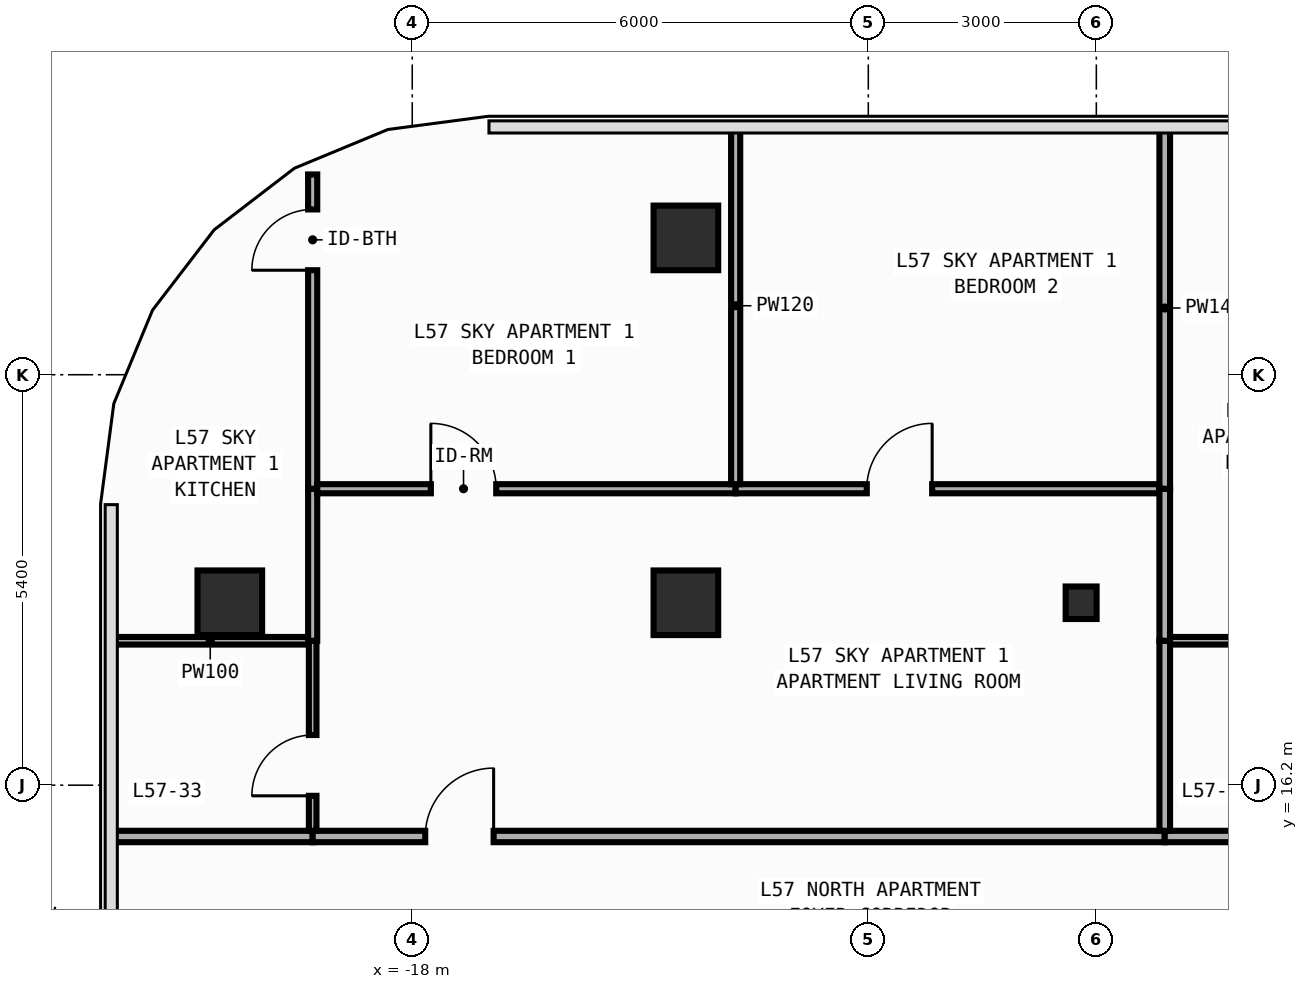
"""IFC4 building model, lengths in metres.
Left out: names, types, materials, properties, quantities, classifications, styles, units other than length and angle.
Written with IfcOpenShell. Run it as: python <this file> out.ifc"""

import sys

from ifc_helpers import new_model, si_unit, direction, frame, frame_2d, origin, origin_2d, place, context, subcontext, project, spatial, rectangle, i_section, extrude, element, fill, save


model = new_model("IFC4")
c1 = context("Model", 3, precision=1e-05, world=origin(), true_north=direction((0.0, 1.0)))
c2 = subcontext(c1, "Body", "Model", "MODEL_VIEW")
j1 = project(units=[si_unit("LENGTHUNIT", "METRE"), si_unit("PLANEANGLEUNIT", "RADIAN")], contexts=[c1])
p1 = place(None, origin())
s1 = spatial("IfcSite", under=j1, at=p1, CompositionType="ELEMENT")
p2 = place(p1, origin())
s2 = spatial("IfcBuilding", under=s1, at=p2, CompositionType="ELEMENT")
p3 = place(p2, frame((0.0, 0.0, 244.0)))
s3 = spatial("IfcBuildingStorey", under=s2, at=p3, CompositionType="ELEMENT", Elevation=244.0)
p4 = place(p3, frame((-9.2, 18.6, 0.0), z_axis=(0.0, 0.0, 1.0), x_axis=(1.0, 0.0, 0.0)))
e1 = element("IfcColumn", 1, at=p4, inside=s3, PredefinedType="COLUMN", context=c2, shape_type="SweptSolid", body=[
    extrude(i_section(OverallWidth=0.407, OverallDepth=0.428, WebThickness=0.02, FlangeThickness=0.035, FilletRadius=0.022, at=origin_2d()), origin(), (0.0, 0.0, 1.0), 3.6),
])
for number, where, z_axis, x_axis in (
    (2, (-20.4, 18.6, 0.0), (0.0, 0.0, 1.0), (1.0, 0.0, 0.0)),
    (3, (-14.4, 18.6, 0.0), (0.0, 0.0, 1.0), (1.0, 0.0, 0.0)),
    (4, (-14.4, 23.4, 0.0), (0.0, 0.0, 1.0), (1.0, 0.0, 0.0)),
):
    element("IfcColumn", number, at=place(p3, frame(where, z_axis=z_axis, x_axis=x_axis)), inside=s3, PredefinedType="COLUMN", context=c2, shape_type="SweptSolid", body=[
        extrude(rectangle(XDim=0.85, YDim=0.85, at=origin_2d()), origin(), (0.0, 0.0, 1.0), 3.6),
    ])
p5 = place(p3, frame((-21.955, 15.525, 0.0), z_axis=(0.0, 0.0, 1.0), x_axis=(1.0, 0.0, 0.0)))
e5 = element("IfcWall", 5, at=p5, inside=s3, PredefinedType="PARTITIONING", context=c2, shape_type="SweptSolid", body=[
    extrude(rectangle(XDim=2.645, YDim=0.15, at=frame_2d((1.323, 0.0))), origin(), (0.0, 0.0, 1.0), 3.34),
])
p6 = place(p3, frame((-19.31, 15.525, 0.0), z_axis=(0.0, 0.0, 1.0), x_axis=(1.0, 0.0, 0.0)))
e6 = element("IfcWall", 6, at=p6, inside=s3, PredefinedType="PARTITIONING", context=c2, shape_type="SweptSolid", body=[
    extrude(rectangle(XDim=11.21, YDim=0.15, at=frame_2d((5.605, 0.0))), origin(), (0.0, 0.0, 1.0), 3.34),
])
p7 = place(p6, frame((1.481, 0.0, 0.0)))
e7 = element("IfcOpeningElement", 7, at=p7, cuts=e6, PredefinedType="OPENING", context=c2, shape_type="SweptSolid", body=[
    extrude(rectangle(XDim=0.9, YDim=2.15, at=frame_2d((0.45, 1.075))), frame((0.0, 0.085, 0.0), z_axis=(0.0, -1.0, 0.0), x_axis=(1.0, 0.0, 0.0)), (0.0, 0.0, 1.0), 0.17),
])
p8 = place(p3, frame((-8.1, 15.525, 0.0), z_axis=(0.0, 0.0, 1.0), x_axis=(1.0, 0.0, 0.0)))
e8 = element("IfcWall", 8, at=p8, inside=s3, PredefinedType="PARTITIONING", context=c2, shape_type="SweptSolid", body=[
    extrude(rectangle(XDim=2.59, YDim=0.15, at=frame_2d((1.295, 0.0))), origin(), (0.0, 0.0, 1.0), 3.34),
])
p9 = place(p3, frame((-21.955, 18.1, 0.0), z_axis=(0.0, 0.0, 1.0), x_axis=(1.0, 0.0, 0.0)))
e9 = element("IfcWall", 9, at=p9, inside=s3, PredefinedType="PARTITIONING", context=c2, shape_type="SweptSolid", body=[
    extrude(rectangle(XDim=2.595, YDim=0.1, at=frame_2d((1.297, 0.0))), origin(), (0.0, 0.0, 1.0), 3.34),
])
p10 = place(p3, frame((-19.31, 15.6, 0.0), z_axis=(0.0, 0.0, 1.0), x_axis=(0.0, 1.0, 0.0)))
e10 = element("IfcWall", 10, at=p10, inside=s3, PredefinedType="PARTITIONING", context=c2, shape_type="SweptSolid", body=[
    extrude(rectangle(XDim=2.5, YDim=0.1, at=frame_2d((1.25, 0.0))), origin(), (0.0, 0.0, 1.0), 3.34),
])
p11 = place(p10, frame((0.46, 0.0, 0.0)))
e11 = element("IfcOpeningElement", 11, at=p11, cuts=e10, PredefinedType="OPENING", context=c2, shape_type="SweptSolid", body=[
    extrude(rectangle(XDim=0.8, YDim=2.1, at=frame_2d((0.4, 1.05))), frame((0.0, 0.06, 0.0), z_axis=(0.0, -1.0, 0.0), x_axis=(1.0, 0.0, 0.0)), (0.0, 0.0, 1.0), 0.12),
])
p12 = place(p3, frame((-19.31, 18.1, 0.0), z_axis=(0.0, 0.0, 1.0), x_axis=(0.0, 1.0, 0.0)))
e12 = element("IfcWall", 12, at=p12, inside=s3, PredefinedType="PARTITIONING", context=c2, shape_type="SweptSolid", body=[
    extrude(rectangle(XDim=2.0, YDim=0.12, at=frame_2d((1.0, 0.0))), origin(), (0.0, 0.0, 1.0), 3.34),
])
p13 = place(p3, frame((-19.31, 20.1, 0.0), z_axis=(0.0, 0.0, 1.0), x_axis=(0.0, 1.0, 0.0)))
e13 = element("IfcWall", 13, at=p13, inside=s3, PredefinedType="PARTITIONING", context=c2, shape_type="SweptSolid", body=[
    extrude(rectangle(XDim=4.135, YDim=0.12, at=frame_2d((2.067, 0.0))), origin(), (0.0, 0.0, 1.0), 3.34),
])
p14 = place(p13, frame((2.875, 0.0, 0.0)))
e14 = element("IfcOpeningElement", 14, at=p14, cuts=e13, PredefinedType="OPENING", context=c2, shape_type="SweptSolid", body=[
    extrude(rectangle(XDim=0.8, YDim=2.1, at=frame_2d((0.4, 1.05))), frame((0.0, 0.07, 0.0), z_axis=(0.0, -1.0, 0.0), x_axis=(1.0, 0.0, 0.0)), (0.0, 0.0, 1.0), 0.14),
])
p15 = place(p3, frame((-19.25, 20.1, 0.0), z_axis=(0.0, 0.0, 1.0), x_axis=(1.0, 0.0, 0.0)))
e15 = element("IfcWall", 15, at=p15, inside=s3, PredefinedType="PARTITIONING", context=c2, shape_type="SweptSolid", body=[
    extrude(rectangle(XDim=5.505, YDim=0.12, at=frame_2d((2.752, 0.0))), origin(), (0.0, 0.0, 1.0), 3.34),
])
p16 = place(p15, frame((1.495, 0.0, 0.0)))
e16 = element("IfcOpeningElement", 16, at=p16, cuts=e15, PredefinedType="OPENING", context=c2, shape_type="SweptSolid", body=[
    extrude(rectangle(XDim=0.86, YDim=2.15, at=frame_2d((0.43, 1.075))), frame((0.0, 0.07, 0.0), z_axis=(0.0, -1.0, 0.0), x_axis=(1.0, 0.0, 0.0)), (0.0, 0.0, 1.0), 0.14),
])
p17 = place(p3, frame((-13.745, 20.1, 0.0), z_axis=(0.0, 0.0, 1.0), x_axis=(1.0, 0.0, 0.0)))
e17 = element("IfcWall", 17, at=p17, inside=s3, PredefinedType="PARTITIONING", context=c2, shape_type="SweptSolid", body=[
    extrude(rectangle(XDim=5.575, YDim=0.12, at=frame_2d((2.788, 0.0))), origin(), (0.0, 0.0, 1.0), 3.34),
])
p18 = place(p17, frame((1.725, 0.0, 0.0)))
e18 = element("IfcOpeningElement", 18, at=p18, cuts=e17, PredefinedType="OPENING", context=c2, shape_type="SweptSolid", body=[
    extrude(rectangle(XDim=0.86, YDim=2.15, at=frame_2d((0.43, 1.075))), frame((0.0, 0.07, 0.0), z_axis=(0.0, -1.0, 0.0), x_axis=(1.0, 0.0, 0.0)), (0.0, 0.0, 1.0), 0.14),
])
p19 = place(p3, frame((-8.1, 15.6, 0.0), z_axis=(0.0, 0.0, 1.0), x_axis=(0.0, 1.0, 0.0)))
e19 = element("IfcWall", 19, at=p19, inside=s3, PredefinedType="PARTITIONING", context=c2, shape_type="SweptSolid", body=[
    extrude(rectangle(XDim=2.5, YDim=0.14, at=frame_2d((1.25, 0.0))), origin(), (0.0, 0.0, 1.0), 3.34),
])
p20 = place(p3, frame((-8.1, 18.1, 0.0), z_axis=(0.0, 0.0, 1.0), x_axis=(0.0, 1.0, 0.0)))
e20 = element("IfcWall", 20, at=p20, inside=s3, PredefinedType="PARTITIONING", context=c2, shape_type="SweptSolid", body=[
    extrude(rectangle(XDim=2.0, YDim=0.14, at=frame_2d((1.0, 0.0))), origin(), (0.0, 0.0, 1.0), 3.34),
])
p21 = place(p3, frame((-13.745, 20.16, 0.0), z_axis=(0.0, 0.0, 1.0), x_axis=(0.0, 1.0, 0.0)))
e21 = element("IfcWall", 21, at=p21, inside=s3, PredefinedType="PARTITIONING", context=c2, shape_type="SweptSolid", body=[
    extrude(rectangle(XDim=4.695, YDim=0.12, at=frame_2d((2.348, 0.0))), origin(), (0.0, 0.0, 1.0), 3.34),
])
p22 = place(p3, frame((-8.1, 20.1, 0.0), z_axis=(0.0, 0.0, 1.0), x_axis=(0.0, 1.0, 0.0)))
e22 = element("IfcWall", 22, at=p22, inside=s3, PredefinedType="PARTITIONING", context=c2, shape_type="SweptSolid", body=[
    extrude(rectangle(XDim=4.755, YDim=0.14, at=frame_2d((2.377, 0.0))), origin(), (0.0, 0.0, 1.0), 3.34),
])
p23 = place(p3, frame((-8.03, 18.1, 0.0), z_axis=(0.0, 0.0, 1.0), x_axis=(1.0, 0.0, 0.0)))
e23 = element("IfcWall", 23, at=p23, inside=s3, PredefinedType="PARTITIONING", context=c2, shape_type="SweptSolid", body=[
    extrude(rectangle(XDim=2.47, YDim=0.1, at=frame_2d((1.235, 0.0))), origin(), (0.0, 0.0, 1.0), 3.34),
])
p24 = place(p7, origin())
e24 = element("IfcDoor", 24, at=p24, inside=s3, OperationType="SINGLE_SWING_RIGHT", PredefinedType="DOOR", context=c2, shape_type="SweptSolid", body=[
    extrude(rectangle(XDim=0.9, YDim=2.15, at=frame_2d((0.45, 1.075))), frame((0.0, 0.025, 0.0), z_axis=(0.0, -1.0, 0.0), x_axis=(1.0, 0.0, 0.0)), (0.0, 0.0, 1.0), 0.05),
])
fill(e7, e24)
p25 = place(p11, origin())
e25 = element("IfcDoor", 25, at=p25, inside=s3, OperationType="SINGLE_SWING_LEFT", PredefinedType="DOOR", context=c2, shape_type="SweptSolid", body=[
    extrude(rectangle(XDim=0.8, YDim=2.1, at=frame_2d((0.4, 1.05))), frame((0.0, 0.025, 0.0), z_axis=(0.0, -1.0, 0.0), x_axis=(1.0, 0.0, 0.0)), (0.0, 0.0, 1.0), 0.05),
])
fill(e11, e25)
p26 = place(p16, origin())
e26 = element("IfcDoor", 26, at=p26, inside=s3, OperationType="SINGLE_SWING_LEFT", PredefinedType="DOOR", context=c2, shape_type="SweptSolid", body=[
    extrude(rectangle(XDim=0.86, YDim=2.15, at=frame_2d((0.43, 1.075))), frame((0.0, 0.025, 0.0), z_axis=(0.0, -1.0, 0.0), x_axis=(1.0, 0.0, 0.0)), (0.0, 0.0, 1.0), 0.05),
])
fill(e16, e26)
p27 = place(p18, origin())
e27 = element("IfcDoor", 27, at=p27, inside=s3, OperationType="SINGLE_SWING_RIGHT", PredefinedType="DOOR", context=c2, shape_type="SweptSolid", body=[
    extrude(rectangle(XDim=0.86, YDim=2.15, at=frame_2d((0.43, 1.075))), frame((0.0, 0.025, 0.0), z_axis=(0.0, -1.0, 0.0), x_axis=(1.0, 0.0, 0.0)), (0.0, 0.0, 1.0), 0.05),
])
fill(e18, e27)
p28 = place(p14, origin())
e28 = element("IfcDoor", 28, at=p28, inside=s3, OperationType="SINGLE_SWING_LEFT", PredefinedType="DOOR", context=c2, shape_type="SweptSolid", body=[
    extrude(rectangle(XDim=0.8, YDim=2.1, at=frame_2d((0.4, 1.05))), frame((0.0, 0.025, 0.0), z_axis=(0.0, -1.0, 0.0), x_axis=(1.0, 0.0, 0.0)), (0.0, 0.0, 1.0), 0.05),
])
fill(e14, e28)
save(model, sys.argv[1])
